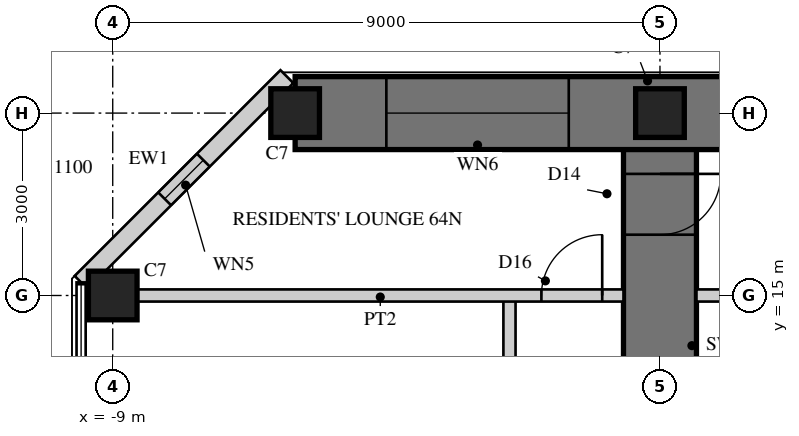
"""IFC4 building model, lengths in metres.
Left out: names, types, materials, properties, quantities, classifications, styles, units other than length and angle.
Written with IfcOpenShell. Run it as: python <this file> out.ifc"""

import sys

from ifc_helpers import new_model, si_unit, direction, frame, frame_2d, origin, origin_2d, place, context, subcontext, project, spatial, rectangle, hollow_rectangle, extrude, element, fill, save


model = new_model("IFC4")
c1 = context("Model", 3, precision=1e-05, world=origin(), true_north=direction((0.0, 1.0)))
c2 = subcontext(c1, "Body", "Model", "MODEL_VIEW")
j1 = project(units=[si_unit("LENGTHUNIT", "METRE"), si_unit("PLANEANGLEUNIT", "RADIAN")], contexts=[c1])
p1 = place(None, origin())
s1 = spatial("IfcSite", under=j1, at=p1, CompositionType="ELEMENT")
p2 = place(p1, origin())
s2 = spatial("IfcBuilding", under=s1, at=p2, CompositionType="ELEMENT")
p3 = place(p2, frame((0.0, 0.0, 249.3)))
s3 = spatial("IfcBuildingStorey", under=s2, at=p3, CompositionType="ELEMENT", Elevation=249.3)
p4 = place(p3, frame((0.0, 9.0, 0.0), z_axis=(0.0, 0.0, 1.0), x_axis=(0.0, 1.0, 0.0)))
e1 = element("IfcWall", 1, at=p4, inside=s3, PredefinedType="SHEAR", context=c2, shape_type="SweptSolid", body=[
    extrude(rectangle(XDim=9.0, YDim=1.2, at=frame_2d((4.5, 0.0))), origin(), (0.0, 0.0, 1.0), 3.4),
])
p5 = place(p4, frame((3.8, 0.0, 0.0)))
e2 = element("IfcOpeningElement", 2, at=p5, cuts=e1, PredefinedType="OPENING", context=c2, shape_type="SweptSolid", body=[
    extrude(rectangle(XDim=1.0, YDim=2.15, at=frame_2d((0.5, 1.075))), frame((0.0, 0.61, 0.0), z_axis=(0.0, -1.0, 0.0), x_axis=(1.0, 0.0, 0.0)), (0.0, 0.0, 1.0), 1.22),
])
p6 = place(p4, frame((7.0, 0.0, 0.0)))
e3 = element("IfcOpeningElement", 3, at=p6, cuts=e1, PredefinedType="OPENING", context=c2, shape_type="SweptSolid", body=[
    extrude(rectangle(XDim=1.0, YDim=2.2, at=frame_2d((0.5, 1.1))), frame((0.0, 0.61, 0.0), z_axis=(0.0, -1.0, 0.0), x_axis=(1.0, 0.0, 0.0)), (0.0, 0.0, 1.0), 1.22),
])
p7 = place(p3, frame((6.0, 18.0, 0.0), z_axis=(0.0, 0.0, 1.0), x_axis=(-1.0, 0.0, 0.0)))
e4 = element("IfcWall", 4, at=p7, inside=s3, PredefinedType="SHEAR", context=c2, shape_type="SweptSolid", body=[
    extrude(rectangle(XDim=12.0, YDim=1.2, at=frame_2d((6.0, 0.0))), origin(), (0.0, 0.0, 1.0), 3.4),
])
p8 = place(p7, frame((1.5, 0.0, 0.6)))
e5 = element("IfcOpeningElement", 5, at=p8, cuts=e4, PredefinedType="OPENING", context=c2, shape_type="SweptSolid", body=[
    extrude(rectangle(XDim=3.0, YDim=2.4, at=frame_2d((1.5, 1.2))), frame((0.0, 0.61, 0.0), z_axis=(0.0, -1.0, 0.0), x_axis=(1.0, 0.0, 0.0)), (0.0, 0.0, 1.0), 1.22),
])
p9 = place(p7, frame((7.5, 0.0, 0.6)))
e6 = element("IfcOpeningElement", 6, at=p9, cuts=e4, PredefinedType="OPENING", context=c2, shape_type="SweptSolid", body=[
    extrude(rectangle(XDim=3.0, YDim=2.4, at=frame_2d((1.5, 1.2))), frame((0.0, 0.61, 0.0), z_axis=(0.0, -1.0, 0.0), x_axis=(1.0, 0.0, 0.0)), (0.0, 0.0, 1.0), 1.22),
])
for number, where, z_axis, x_axis in (
    (7, (-9.0, 15.0, 0.0), (0.0, 0.0, 1.0), (1.0, 0.0, 0.0)),
    (8, (0.0, 18.0, 0.0), (0.0, 0.0, 1.0), (1.0, 0.0, 0.0)),
    (9, (-6.0, 18.0, 0.0), (0.0, 0.0, 1.0), (1.0, 0.0, 0.0)),
):
    element("IfcColumn", number, at=place(p3, frame(where, z_axis=z_axis, x_axis=x_axis)), inside=s3, PredefinedType="COLUMN", context=c2, shape_type="SweptSolid", body=[
        extrude(rectangle(XDim=0.8, YDim=0.8, at=origin_2d()), origin(), (0.0, 0.0, 1.0), 3.4),
    ])
p10 = place(p3, frame((-6.135, 18.6, 0.0), z_axis=(0.0, 0.0, 1.0), x_axis=(-0.707081278264, -0.707132283189, 0.0)))
e10 = element("IfcWall", 10, at=p10, inside=s3, PredefinedType="SOLIDWALL", context=c2, shape_type="SweptSolid", body=[
    extrude(rectangle(XDim=4.787, YDim=0.3, at=frame_2d((2.393, 0.0))), origin(), (0.0, 0.0, 1.0), 3.15),
])
p11 = place(p10, frame((1.943, 0.0, 0.3)))
e11 = element("IfcOpeningElement", 11, at=p11, cuts=e10, PredefinedType="OPENING", context=c2, shape_type="SweptSolid", body=[
    extrude(rectangle(XDim=0.9, YDim=2.4, at=frame_2d((0.45, 1.2))), frame((0.0, 0.16, 0.0), z_axis=(0.0, -1.0, 0.0), x_axis=(1.0, 0.0, 0.0)), (0.0, 0.0, 1.0), 0.32),
])
p12 = place(p3, frame((-2.475, 9.4, 0.0), z_axis=(0.0, 0.0, 1.0), x_axis=(0.0, 1.0, 0.0)))
e12 = element("IfcWall", 12, at=p12, inside=s3, PredefinedType="SOLIDWALL", context=c2, shape_type="SweptSolid", body=[
    extrude(rectangle(XDim=5.6, YDim=0.2, at=frame_2d((2.8, 0.0))), origin(), (0.0, 0.0, 1.0), 3.15),
])
p13 = place(p12, frame((1.2, 0.0, 0.0)))
e13 = element("IfcOpeningElement", 13, at=p13, cuts=e12, PredefinedType="OPENING", context=c2, shape_type="SweptSolid", body=[
    extrude(rectangle(XDim=1.0, YDim=2.2, at=frame_2d((0.5, 1.1))), frame((0.0, 0.11, 0.0), z_axis=(0.0, -1.0, 0.0), x_axis=(1.0, 0.0, 0.0)), (0.0, 0.0, 1.0), 0.22),
])
p14 = place(p3, frame((8.6, 15.0, 0.0), z_axis=(0.0, 0.0, 1.0), x_axis=(-1.0, 0.0, 0.0)))
e14 = element("IfcWall", 14, at=p14, inside=s3, PredefinedType="SOLIDWALL", context=c2, shape_type="SweptSolid", body=[
    extrude(rectangle(XDim=8.0, YDim=0.2, at=frame_2d((4.0, 0.0))), origin(), (0.0, 0.0, 1.0), 2.1),
])
p15 = place(p3, frame((-0.6, 15.0, 0.0), z_axis=(0.0, 0.0, 1.0), x_axis=(-1.0, 0.0, 0.0)))
e15 = element("IfcWall", 15, at=p15, inside=s3, PredefinedType="SOLIDWALL", context=c2, shape_type="SweptSolid", body=[
    extrude(rectangle(XDim=8.0, YDim=0.2, at=frame_2d((4.0, 0.0))), origin(), (0.0, 0.0, 1.0), 2.1),
])
p16 = place(p15, frame((0.35, 0.0, 0.0)))
e16 = element("IfcOpeningElement", 16, at=p16, cuts=e15, PredefinedType="OPENING", context=c2, shape_type="SweptSolid", body=[
    extrude(rectangle(XDim=1.0, YDim=2.0, at=frame_2d((0.5, 1.0))), frame((0.0, 0.11, 0.0), z_axis=(0.0, -1.0, 0.0), x_axis=(1.0, 0.0, 0.0)), (0.0, 0.0, 1.0), 0.22),
])
p17 = place(p9, origin())
e17 = element("IfcWindow", 17, at=p17, inside=s3, PartitioningType="SINGLE_PANEL", PredefinedType="WINDOW", context=c2, shape_type="SweptSolid", body=[
    extrude(hollow_rectangle(XDim=3.0, YDim=2.4, WallThickness=0.06, at=frame_2d((1.5, 1.2))), frame((0.0, 0.03, 0.0), z_axis=(0.0, -1.0, 0.0), x_axis=(1.0, 0.0, 0.0)), (0.0, 0.0, 1.0), 0.06),
    extrude(rectangle(XDim=2.879, YDim=2.279, at=frame_2d((1.5, 1.2))), frame((0.0, 0.03, 0.0), z_axis=(0.0, -1.0, 0.0), x_axis=(1.0, 0.0, 0.0)), (0.0, 0.0, 1.0), 0.06),
])
fill(e6, e17)
p18 = place(p11, origin())
e18 = element("IfcWindow", 18, at=p18, inside=s3, PartitioningType="SINGLE_PANEL", PredefinedType="WINDOW", context=c2, shape_type="SweptSolid", body=[
    extrude(hollow_rectangle(XDim=0.9, YDim=2.4, WallThickness=0.06, at=frame_2d((0.45, 1.2))), frame((0.0, 0.03, 0.0), z_axis=(0.0, -1.0, 0.0), x_axis=(1.0, 0.0, 0.0)), (0.0, 0.0, 1.0), 0.06),
    extrude(rectangle(XDim=0.779, YDim=2.279, at=frame_2d((0.45, 1.2))), frame((0.0, 0.03, 0.0), z_axis=(0.0, -1.0, 0.0), x_axis=(1.0, 0.0, 0.0)), (0.0, 0.0, 1.0), 0.06),
])
fill(e11, e18)
p19 = place(p16, frame((1.0, 0.0, 0.0), z_axis=(0.0, 0.0, 1.0), x_axis=(-1.0, 0.0, 0.0)))
e19 = element("IfcDoor", 19, at=p19, inside=s3, OperationType="SINGLE_SWING_RIGHT", PredefinedType="DOOR", context=c2, shape_type="SweptSolid", body=[
    extrude(rectangle(XDim=1.0, YDim=2.0, at=frame_2d((0.5, 1.0))), frame((0.0, 0.025, 0.0), z_axis=(0.0, -1.0, 0.0), x_axis=(1.0, 0.0, 0.0)), (0.0, 0.0, 1.0), 0.05),
])
fill(e16, e19)
p20 = place(p6, frame((1.0, 0.0, 0.0), z_axis=(0.0, 0.0, 1.0), x_axis=(-1.0, 0.0, 0.0)))
e20 = element("IfcDoor", 20, at=p20, inside=s3, OperationType="SINGLE_SWING_LEFT", PredefinedType="DOOR", context=c2, shape_type="SweptSolid", body=[
    extrude(rectangle(XDim=1.0, YDim=2.2, at=frame_2d((0.5, 1.1))), frame((0.0, 0.025, 0.0), z_axis=(0.0, -1.0, 0.0), x_axis=(1.0, 0.0, 0.0)), (0.0, 0.0, 1.0), 0.05),
])
fill(e3, e20)
save(model, sys.argv[1])
